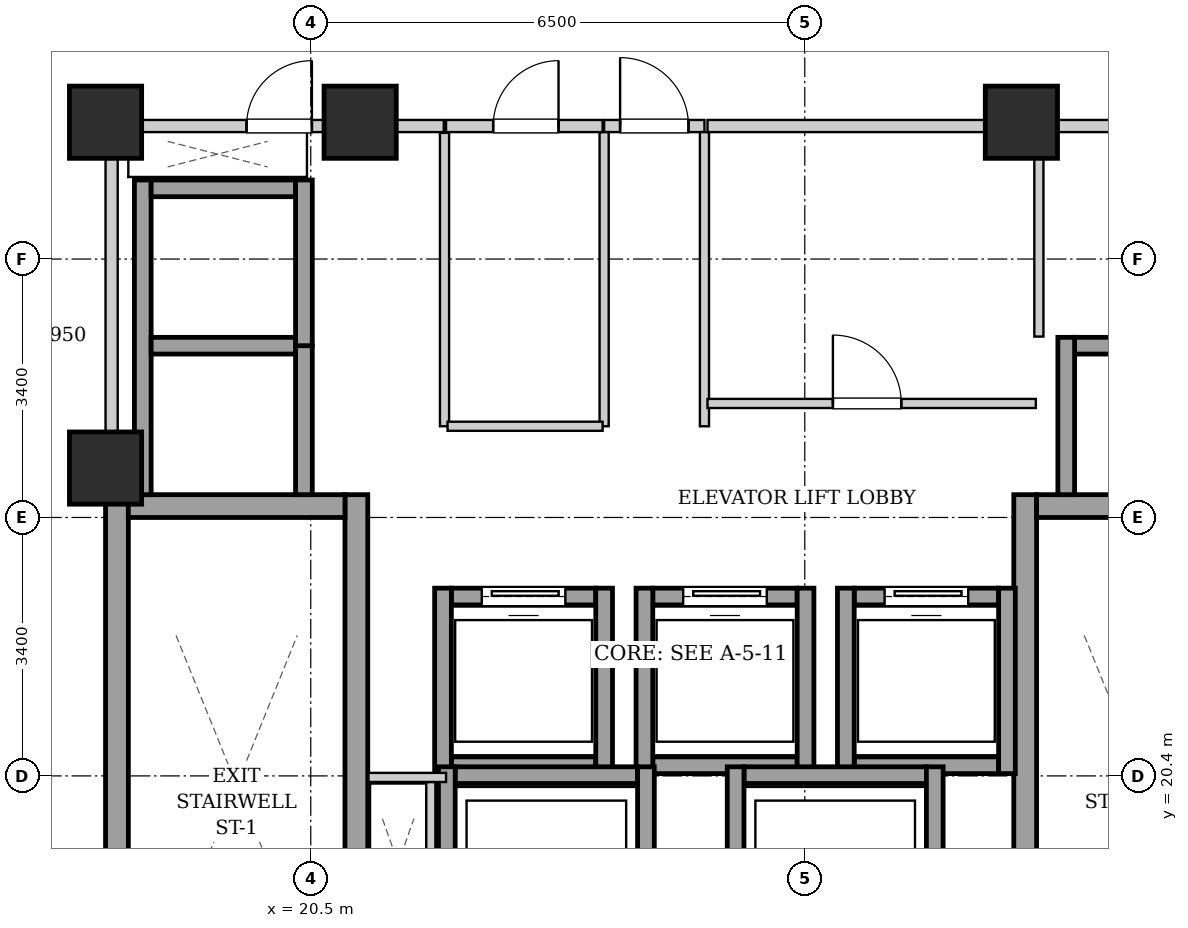
"""IFC4 building model, lengths in metres.
Left out: names, types, materials, properties, quantities, classifications, styles, units other than length and angle.
Written with IfcOpenShell. Run it as: python <this file> out.ifc"""

import sys

from ifc_helpers import new_model, si_unit, direction, frame, frame_2d, origin, origin_2d, place, context, subcontext, project, spatial, rectangle, extrude, element, fill, save


model = new_model("IFC4")
c1 = context("Model", 3, precision=1e-05, world=origin(), true_north=direction((0.0, 1.0)))
c2 = subcontext(c1, "Body", "Model", "MODEL_VIEW")
j1 = project(units=[si_unit("LENGTHUNIT", "METRE"), si_unit("PLANEANGLEUNIT", "RADIAN")], contexts=[c1])
p1 = place(None, origin())
s1 = spatial("IfcSite", under=j1, at=p1, CompositionType="ELEMENT")
p2 = place(p1, origin())
s2 = spatial("IfcBuilding", under=s1, at=p2, CompositionType="ELEMENT")
p3 = place(p2, frame((0.0, 0.0, 143.9)))
s3 = spatial("IfcBuildingStorey", under=s2, at=p3, CompositionType="ELEMENT", Elevation=143.9)
for number, where, z_axis, x_axis in (
    (1, (17.8, 29.0, 0.0), (0.0, 0.0, 1.0), (1.0, 0.0, 0.0)),
    (2, (21.15, 29.0, 0.0), (0.0, 0.0, 1.0), (1.0, 0.0, 0.0)),
    (3, (29.85, 29.0, 0.0), (0.0, 0.0, 1.0), (1.0, 0.0, 0.0)),
    (4, (17.8, 24.45, 0.0), (0.0, 0.0, 1.0), (1.0, 0.0, 0.0)),
):
    element("IfcColumn", number, at=place(p3, frame(where, z_axis=z_axis, x_axis=x_axis)), inside=s3, PredefinedType="COLUMN", context=c2, shape_type="SweptSolid", body=[
        extrude(rectangle(XDim=0.95, YDim=0.95, at=origin_2d()), origin(), (0.0, 0.0, 1.0), 3.25),
    ])
for number, where, z_axis, x_axis in (
    (5, (17.95, 15.1, 0.0), (0.0, 0.0, 1.0), (0.0, 1.0, 0.0)),
    (6, (21.1, 15.1, 0.0), (0.0, 0.0, 1.0), (0.0, 1.0, 0.0)),
):
    element("IfcWall", number, at=place(p3, frame(where, z_axis=z_axis, x_axis=x_axis)), inside=s3, PredefinedType="SHEAR", context=c2, shape_type="SweptSolid", body=[
        extrude(rectangle(XDim=9.0, YDim=0.3, at=frame_2d((4.5, 0.0))), origin(), (0.0, 0.0, 1.0), 2.99),
    ])
p4 = place(p3, frame((18.1, 23.95, 0.0), z_axis=(0.0, 0.0, 1.0), x_axis=(1.0, 0.0, 0.0)))
e7 = element("IfcWall", 7, at=p4, inside=s3, PredefinedType="SHEAR", context=c2, shape_type="SweptSolid", body=[
    extrude(rectangle(XDim=2.85, YDim=0.3, at=frame_2d((1.425, 0.0))), origin(), (0.0, 0.0, 1.0), 2.99),
])
p5 = place(p3, frame((29.9, 15.1, 0.0), z_axis=(0.0, 0.0, 1.0), x_axis=(0.0, 1.0, 0.0)))
e8 = element("IfcWall", 8, at=p5, inside=s3, PredefinedType="SHEAR", context=c2, shape_type="SweptSolid", body=[
    extrude(rectangle(XDim=9.0, YDim=0.3, at=frame_2d((4.5, 0.0))), origin(), (0.0, 0.0, 1.0), 2.99),
])
p6 = place(p3, frame((30.05, 23.95, 0.0), z_axis=(0.0, 0.0, 1.0), x_axis=(1.0, 0.0, 0.0)))
e9 = element("IfcWall", 9, at=p6, inside=s3, PredefinedType="SHEAR", context=c2, shape_type="SweptSolid", body=[
    extrude(rectangle(XDim=2.85, YDim=0.3, at=frame_2d((1.425, 0.0))), origin(), (0.0, 0.0, 1.0), 2.99),
])
p7 = place(p3, frame((22.35, 20.54, 0.0), z_axis=(0.0, 0.0, 1.0), x_axis=(1.0, 0.0, 0.0)))
e10 = element("IfcWall", 10, at=p7, inside=s3, PredefinedType="SHEAR", context=c2, shape_type="SweptSolid", body=[
    extrude(rectangle(XDim=1.9, YDim=0.22, at=frame_2d((0.95, 0.0))), origin(), (0.0, 0.0, 1.0), 2.99),
])
p8 = place(p3, frame((22.35, 22.76, 0.0), z_axis=(0.0, 0.0, 1.0), x_axis=(1.0, 0.0, 0.0)))
e11 = element("IfcWall", 11, at=p8, inside=s3, PredefinedType="SHEAR", context=c2, shape_type="SweptSolid", body=[
    extrude(rectangle(XDim=1.9, YDim=0.22, at=frame_2d((0.95, 0.0))), origin(), (0.0, 0.0, 1.0), 2.99),
])
p9 = place(p8, frame((0.4, 0.0, 0.0)))
e12 = element("IfcOpeningElement", 12, at=p9, cuts=e11, PredefinedType="OPENING", context=c2, shape_type="SweptSolid", body=[
    extrude(rectangle(XDim=1.1, YDim=2.15, at=frame_2d((0.55, 1.075))), frame((0.0, 0.12, 0.0), z_axis=(0.0, -1.0, 0.0), x_axis=(1.0, 0.0, 0.0)), (0.0, 0.0, 1.0), 0.24),
])
for number, where, z_axis, x_axis in (
    (13, (22.24, 20.43, 0.0), (0.0, 0.0, 1.0), (0.0, 1.0, 0.0)),
    (14, (24.36, 20.43, 0.0), (0.0, 0.0, 1.0), (0.0, 1.0, 0.0)),
):
    element("IfcWall", number, at=place(p3, frame(where, z_axis=z_axis, x_axis=x_axis)), inside=s3, PredefinedType="SHEAR", context=c2, shape_type="SweptSolid", body=[
        extrude(rectangle(XDim=2.44, YDim=0.22, at=frame_2d((1.22, 0.0))), origin(), (0.0, 0.0, 1.0), 2.99),
    ])
p10 = place(p3, frame((25.0, 20.54, 0.0), z_axis=(0.0, 0.0, 1.0), x_axis=(1.0, 0.0, 0.0)))
e15 = element("IfcWall", 15, at=p10, inside=s3, PredefinedType="SHEAR", context=c2, shape_type="SweptSolid", body=[
    extrude(rectangle(XDim=1.9, YDim=0.22, at=frame_2d((0.95, 0.0))), origin(), (0.0, 0.0, 1.0), 2.99),
])
p11 = place(p3, frame((25.0, 22.76, 0.0), z_axis=(0.0, 0.0, 1.0), x_axis=(1.0, 0.0, 0.0)))
e16 = element("IfcWall", 16, at=p11, inside=s3, PredefinedType="SHEAR", context=c2, shape_type="SweptSolid", body=[
    extrude(rectangle(XDim=1.9, YDim=0.22, at=frame_2d((0.95, 0.0))), origin(), (0.0, 0.0, 1.0), 2.99),
])
p12 = place(p11, frame((0.4, 0.0, 0.0)))
e17 = element("IfcOpeningElement", 17, at=p12, cuts=e16, PredefinedType="OPENING", context=c2, shape_type="SweptSolid", body=[
    extrude(rectangle(XDim=1.1, YDim=2.15, at=frame_2d((0.55, 1.075))), frame((0.0, 0.12, 0.0), z_axis=(0.0, -1.0, 0.0), x_axis=(1.0, 0.0, 0.0)), (0.0, 0.0, 1.0), 0.24),
])
for number, where, z_axis, x_axis in (
    (18, (24.89, 20.43, 0.0), (0.0, 0.0, 1.0), (0.0, 1.0, 0.0)),
    (19, (27.01, 20.43, 0.0), (0.0, 0.0, 1.0), (0.0, 1.0, 0.0)),
):
    element("IfcWall", number, at=place(p3, frame(where, z_axis=z_axis, x_axis=x_axis)), inside=s3, PredefinedType="SHEAR", context=c2, shape_type="SweptSolid", body=[
        extrude(rectangle(XDim=2.44, YDim=0.22, at=frame_2d((1.22, 0.0))), origin(), (0.0, 0.0, 1.0), 2.99),
    ])
p13 = place(p3, frame((27.65, 20.54, 0.0), z_axis=(0.0, 0.0, 1.0), x_axis=(1.0, 0.0, 0.0)))
e20 = element("IfcWall", 20, at=p13, inside=s3, PredefinedType="SHEAR", context=c2, shape_type="SweptSolid", body=[
    extrude(rectangle(XDim=1.9, YDim=0.22, at=frame_2d((0.95, 0.0))), origin(), (0.0, 0.0, 1.0), 2.99),
])
p14 = place(p3, frame((27.65, 22.76, 0.0), z_axis=(0.0, 0.0, 1.0), x_axis=(1.0, 0.0, 0.0)))
e21 = element("IfcWall", 21, at=p14, inside=s3, PredefinedType="SHEAR", context=c2, shape_type="SweptSolid", body=[
    extrude(rectangle(XDim=1.9, YDim=0.22, at=frame_2d((0.95, 0.0))), origin(), (0.0, 0.0, 1.0), 2.99),
])
p15 = place(p14, frame((0.4, 0.0, 0.0)))
e22 = element("IfcOpeningElement", 22, at=p15, cuts=e21, PredefinedType="OPENING", context=c2, shape_type="SweptSolid", body=[
    extrude(rectangle(XDim=1.1, YDim=2.15, at=frame_2d((0.55, 1.075))), frame((0.0, 0.12, 0.0), z_axis=(0.0, -1.0, 0.0), x_axis=(1.0, 0.0, 0.0)), (0.0, 0.0, 1.0), 0.24),
])
for number, where, z_axis, x_axis in (
    (23, (27.54, 20.43, 0.0), (0.0, 0.0, 1.0), (0.0, 1.0, 0.0)),
    (24, (29.66, 20.43, 0.0), (0.0, 0.0, 1.0), (0.0, 1.0, 0.0)),
):
    element("IfcWall", number, at=place(p3, frame(where, z_axis=z_axis, x_axis=x_axis)), inside=s3, PredefinedType="SHEAR", context=c2, shape_type="SweptSolid", body=[
        extrude(rectangle(XDim=2.44, YDim=0.22, at=frame_2d((1.22, 0.0))), origin(), (0.0, 0.0, 1.0), 2.99),
    ])
p16 = place(p3, frame((18.29, 24.1, 0.0), z_axis=(0.0, 0.0, 1.0), x_axis=(0.0, 1.0, 0.0)))
e25 = element("IfcWall", 25, at=p16, inside=s3, PredefinedType="SHEAR", context=c2, shape_type="SweptSolid", body=[
    extrude(rectangle(XDim=4.14, YDim=0.22, at=frame_2d((2.07, 0.0))), origin(), (0.0, 0.0, 1.0), 2.99),
])
p17 = place(p3, frame((20.41, 24.1, 0.0), z_axis=(0.0, 0.0, 1.0), x_axis=(0.0, 1.0, 0.0)))
e26 = element("IfcWall", 26, at=p17, inside=s3, PredefinedType="SHEAR", context=c2, shape_type="SweptSolid", body=[
    extrude(rectangle(XDim=1.96, YDim=0.22, at=frame_2d((0.98, 0.0))), origin(), (0.0, 0.0, 1.0), 2.99),
])
for number, where, z_axis, x_axis in (
    (27, (18.4, 26.06, 0.0), (0.0, 0.0, 1.0), (1.0, 0.0, 0.0)),
    (28, (18.4, 28.13, 0.0), (0.0, 0.0, 1.0), (1.0, 0.0, 0.0)),
):
    element("IfcWall", number, at=place(p3, frame(where, z_axis=z_axis, x_axis=x_axis)), inside=s3, PredefinedType="SHEAR", context=c2, shape_type="SweptSolid", body=[
        extrude(rectangle(XDim=1.9, YDim=0.22, at=frame_2d((0.95, 0.0))), origin(), (0.0, 0.0, 1.0), 2.99),
    ])
p18 = place(p3, frame((20.41, 26.06, 0.0), z_axis=(0.0, 0.0, 1.0), x_axis=(0.0, 1.0, 0.0)))
e29 = element("IfcWall", 29, at=p18, inside=s3, PredefinedType="SHEAR", context=c2, shape_type="SweptSolid", body=[
    extrude(rectangle(XDim=2.18, YDim=0.22, at=frame_2d((1.09, 0.0))), origin(), (0.0, 0.0, 1.0), 2.99),
])
p19 = place(p3, frame((30.55, 26.06, 0.0), z_axis=(0.0, 0.0, 1.0), x_axis=(1.0, 0.0, 0.0)))
e30 = element("IfcWall", 30, at=p19, inside=s3, PredefinedType="SHEAR", context=c2, shape_type="SweptSolid", body=[
    extrude(rectangle(XDim=1.9, YDim=0.22, at=frame_2d((0.95, 0.0))), origin(), (0.0, 0.0, 1.0), 2.99),
])
p20 = place(p3, frame((30.44, 24.1, 0.0), z_axis=(0.0, 0.0, 1.0), x_axis=(0.0, 1.0, 0.0)))
e31 = element("IfcWall", 31, at=p20, inside=s3, PredefinedType="SHEAR", context=c2, shape_type="SweptSolid", body=[
    extrude(rectangle(XDim=2.07, YDim=0.22, at=frame_2d((1.035, 0.0))), origin(), (0.0, 0.0, 1.0), 2.99),
])
p21 = place(p3, frame((22.4, 20.41, 0.0), z_axis=(0.0, 0.0, 1.0), x_axis=(1.0, 0.0, 0.0)))
e32 = element("IfcWall", 32, at=p21, inside=s3, PredefinedType="SHEAR", context=c2, shape_type="SweptSolid", body=[
    extrude(rectangle(XDim=2.4, YDim=0.22, at=frame_2d((1.2, 0.0))), origin(), (0.0, 0.0, 1.0), 2.99),
])
for number, where, z_axis, x_axis in (
    (33, (22.29, 17.98, 0.0), (0.0, 0.0, 1.0), (0.0, 1.0, 0.0)),
    (34, (24.91, 17.98, 0.0), (0.0, 0.0, 1.0), (0.0, 1.0, 0.0)),
):
    element("IfcWall", number, at=place(p3, frame(where, z_axis=z_axis, x_axis=x_axis)), inside=s3, PredefinedType="SHEAR", context=c2, shape_type="SweptSolid", body=[
        extrude(rectangle(XDim=2.54, YDim=0.22, at=frame_2d((1.27, 0.0))), origin(), (0.0, 0.0, 1.0), 2.99),
    ])
p22 = place(p3, frame((26.2, 20.41, 0.0), z_axis=(0.0, 0.0, 1.0), x_axis=(1.0, 0.0, 0.0)))
e35 = element("IfcWall", 35, at=p22, inside=s3, PredefinedType="SHEAR", context=c2, shape_type="SweptSolid", body=[
    extrude(rectangle(XDim=2.4, YDim=0.22, at=frame_2d((1.2, 0.0))), origin(), (0.0, 0.0, 1.0), 2.99),
])
for number, where, z_axis, x_axis in (
    (36, (26.09, 17.98, 0.0), (0.0, 0.0, 1.0), (0.0, 1.0, 0.0)),
    (37, (28.71, 17.98, 0.0), (0.0, 0.0, 1.0), (0.0, 1.0, 0.0)),
):
    element("IfcWall", number, at=place(p3, frame(where, z_axis=z_axis, x_axis=x_axis)), inside=s3, PredefinedType="SHEAR", context=c2, shape_type="SweptSolid", body=[
        extrude(rectangle(XDim=2.54, YDim=0.22, at=frame_2d((1.27, 0.0))), origin(), (0.0, 0.0, 1.0), 2.99),
    ])
p23 = place(p3, frame((17.88, 24.12, 0.0), z_axis=(0.0, 0.0, 1.0), x_axis=(0.0, 1.0, 0.0)))
e38 = element("IfcWall", 38, at=p23, inside=s3, PredefinedType="PARTITIONING", context=c2, shape_type="SweptSolid", body=[
    extrude(rectangle(XDim=4.76, YDim=0.16, at=frame_2d((2.38, 0.0))), origin(), (0.0, 0.0, 1.0), 2.99),
])
p24 = place(p3, frame((24.36, 28.95, 0.0), z_axis=(0.0, 0.0, 1.0), x_axis=(1.0, 0.0, 0.0)))
e39 = element("IfcWall", 39, at=p24, inside=s3, PredefinedType="PARTITIONING", context=c2, shape_type="SweptSolid", body=[
    extrude(rectangle(XDim=1.32, YDim=0.16, at=frame_2d((0.66, 0.0))), origin(), (0.0, 0.0, 1.0), 2.426),
])
p25 = place(p24, frame((0.21, 0.0, 0.0)))
e40 = element("IfcOpeningElement", 40, at=p25, cuts=e39, PredefinedType="OPENING", context=c2, shape_type="SweptSolid", body=[
    extrude(rectangle(XDim=0.9, YDim=2.05, at=frame_2d((0.45, 1.025))), frame((0.0, 0.09, 0.0), z_axis=(0.0, -1.0, 0.0), x_axis=(1.0, 0.0, 0.0)), (0.0, 0.0, 1.0), 0.18),
])
p26 = place(p3, frame((17.96, 28.95, 0.0), z_axis=(0.0, 0.0, 1.0), x_axis=(1.0, 0.0, 0.0)))
e41 = element("IfcWall", 41, at=p26, inside=s3, PredefinedType="PARTITIONING", context=c2, shape_type="SweptSolid", body=[
    extrude(rectangle(XDim=4.29, YDim=0.16, at=frame_2d((2.145, 0.0))), origin(), (0.0, 0.0, 1.0), 2.426),
])
p27 = place(p26, frame((1.695, 0.0, 0.0)))
e42 = element("IfcOpeningElement", 42, at=p27, cuts=e41, PredefinedType="OPENING", context=c2, shape_type="SweptSolid", body=[
    extrude(rectangle(XDim=0.86, YDim=2.05, at=frame_2d((0.43, 1.025))), frame((0.0, 0.09, 0.0), z_axis=(0.0, -1.0, 0.0), x_axis=(1.0, 0.0, 0.0)), (0.0, 0.0, 1.0), 0.18),
])
p28 = place(p3, frame((22.08, 18.2, 0.0), z_axis=(0.0, 0.0, 1.0), x_axis=(0.0, 1.0, 0.0)))
e43 = element("IfcWall", 43, at=p28, inside=s3, PredefinedType="PARTITIONING", context=c2, shape_type="SweptSolid", body=[
    extrude(rectangle(XDim=2.12, YDim=0.12, at=frame_2d((1.06, 0.0))), origin(), (0.0, 0.0, 1.0), 2.99),
])
p29 = place(p3, frame((22.28, 20.38, 0.0), z_axis=(0.0, 0.0, 1.0), x_axis=(-1.0, 0.0, 0.0)))
e44 = element("IfcWall", 44, at=p29, inside=s3, PredefinedType="PARTITIONING", context=c2, shape_type="SweptSolid", body=[
    extrude(rectangle(XDim=1.02, YDim=0.12, at=frame_2d((0.51, 0.0))), origin(), (0.0, 0.0, 1.0), 2.99),
])
for number, where, z_axis, x_axis in (
    (45, (24.36, 25.0, 0.0), (0.0, 0.0, 1.0), (0.0, 1.0, 0.0)),
    (46, (25.68, 25.0, 0.0), (0.0, 0.0, 1.0), (0.0, 1.0, 0.0)),
):
    element("IfcWall", number, at=place(p3, frame(where, z_axis=z_axis, x_axis=x_axis)), inside=s3, PredefinedType="PARTITIONING", context=c2, shape_type="SweptSolid", body=[
        extrude(rectangle(XDim=3.87, YDim=0.12, at=frame_2d((1.935, 0.0))), origin(), (0.0, 0.0, 1.0), 2.99),
    ])
p30 = place(p3, frame((30.08, 26.18, 0.0), z_axis=(0.0, 0.0, 1.0), x_axis=(0.0, 1.0, 0.0)))
e47 = element("IfcWall", 47, at=p30, inside=s3, PredefinedType="PARTITIONING", context=c2, shape_type="SweptSolid", body=[
    extrude(rectangle(XDim=2.68, YDim=0.12, at=frame_2d((1.34, 0.0))), origin(), (0.0, 0.0, 1.0), 2.99),
])
p31 = place(p3, frame((30.08, 28.95, 0.0), z_axis=(0.0, 0.0, 1.0), x_axis=(1.0, 0.0, 0.0)))
e48 = element("IfcWall", 48, at=p31, inside=s3, PredefinedType="PARTITIONING", context=c2, shape_type="SweptSolid", body=[
    extrude(rectangle(XDim=2.96, YDim=0.16, at=frame_2d((1.48, 0.0))), origin(), (0.0, 0.0, 1.0), 2.99),
])
p32 = place(p31, frame((1.045, 0.0, 0.0)))
e49 = element("IfcOpeningElement", 49, at=p32, cuts=e48, PredefinedType="OPENING", context=c2, shape_type="SweptSolid", body=[
    extrude(rectangle(XDim=0.86, YDim=2.05, at=frame_2d((0.43, 1.025))), frame((0.0, 0.09, 0.0), z_axis=(0.0, -1.0, 0.0), x_axis=(1.0, 0.0, 0.0)), (0.0, 0.0, 1.0), 0.18),
])
p33 = place(p3, frame((22.26, 25.0, 0.0), z_axis=(0.0, 0.0, 1.0), x_axis=(0.0, 1.0, 0.0)))
e50 = element("IfcWall", 50, at=p33, inside=s3, PredefinedType="PARTITIONING", context=c2, shape_type="SweptSolid", body=[
    extrude(rectangle(XDim=3.86, YDim=0.12, at=frame_2d((1.93, 0.0))), origin(), (0.0, 0.0, 1.0), 2.99),
])
p34 = place(p3, frame((22.3, 25.0, 0.0), z_axis=(0.0, 0.0, 1.0), x_axis=(1.0, 0.0, 0.0)))
e51 = element("IfcWall", 51, at=p34, inside=s3, PredefinedType="PARTITIONING", context=c2, shape_type="SweptSolid", body=[
    extrude(rectangle(XDim=2.04, YDim=0.12, at=frame_2d((1.02, 0.0))), origin(), (0.0, 0.0, 1.0), 2.99),
])
p35 = place(p3, frame((22.28, 28.95, 0.0), z_axis=(0.0, 0.0, 1.0), x_axis=(1.0, 0.0, 0.0)))
e52 = element("IfcWall", 52, at=p35, inside=s3, PredefinedType="PARTITIONING", context=c2, shape_type="SweptSolid", body=[
    extrude(rectangle(XDim=2.06, YDim=0.16, at=frame_2d((1.03, 0.0))), origin(), (0.0, 0.0, 1.0), 2.426),
])
p36 = place(p35, frame((0.62, 0.0, 0.0)))
e53 = element("IfcOpeningElement", 53, at=p36, cuts=e52, PredefinedType="OPENING", context=c2, shape_type="SweptSolid", body=[
    extrude(rectangle(XDim=0.86, YDim=2.05, at=frame_2d((0.43, 1.025))), frame((0.0, 0.09, 0.0), z_axis=(0.0, -1.0, 0.0), x_axis=(1.0, 0.0, 0.0)), (0.0, 0.0, 1.0), 0.18),
])
p37 = place(p3, frame((25.72, 28.95, 0.0), z_axis=(0.0, 0.0, 1.0), x_axis=(1.0, 0.0, 0.0)))
e54 = element("IfcWall", 54, at=p37, inside=s3, PredefinedType="PARTITIONING", context=c2, shape_type="SweptSolid", body=[
    extrude(rectangle(XDim=4.32, YDim=0.16, at=frame_2d((2.16, 0.0))), origin(), (0.0, 0.0, 1.0), 2.426),
])
p38 = place(p3, frame((25.72, 25.3, 0.0), z_axis=(0.0, 0.0, 1.0), x_axis=(1.0, 0.0, 0.0)))
e55 = element("IfcWall", 55, at=p38, inside=s3, PredefinedType="PARTITIONING", context=c2, shape_type="SweptSolid", body=[
    extrude(rectangle(XDim=4.32, YDim=0.12, at=frame_2d((2.16, 0.0))), origin(), (0.0, 0.0, 1.0), 2.99),
])
p39 = place(p38, frame((1.65, 0.0, 0.0)))
e56 = element("IfcOpeningElement", 56, at=p39, cuts=e55, PredefinedType="OPENING", context=c2, shape_type="SweptSolid", body=[
    extrude(rectangle(XDim=0.9, YDim=2.05, at=frame_2d((0.45, 1.025))), frame((0.0, 0.07, 0.0), z_axis=(0.0, -1.0, 0.0), x_axis=(1.0, 0.0, 0.0)), (0.0, 0.0, 1.0), 0.14),
])
p40 = place(p9, origin())
e57 = element("IfcDoor", 57, at=p40, inside=s3, OperationType="SLIDING_TO_LEFT", PredefinedType="DOOR", context=c2, shape_type="SweptSolid", body=[
    extrude(rectangle(XDim=1.1, YDim=2.15, at=frame_2d((0.55, 1.075))), frame((0.0, 0.025, 0.0), z_axis=(0.0, -1.0, 0.0), x_axis=(1.0, 0.0, 0.0)), (0.0, 0.0, 1.0), 0.05),
])
fill(e12, e57)
p41 = place(p12, origin())
e58 = element("IfcDoor", 58, at=p41, inside=s3, OperationType="SLIDING_TO_LEFT", PredefinedType="DOOR", context=c2, shape_type="SweptSolid", body=[
    extrude(rectangle(XDim=1.1, YDim=2.15, at=frame_2d((0.55, 1.075))), frame((0.0, 0.025, 0.0), z_axis=(0.0, -1.0, 0.0), x_axis=(1.0, 0.0, 0.0)), (0.0, 0.0, 1.0), 0.05),
])
fill(e17, e58)
p42 = place(p15, origin())
e59 = element("IfcDoor", 59, at=p42, inside=s3, OperationType="SLIDING_TO_LEFT", PredefinedType="DOOR", context=c2, shape_type="SweptSolid", body=[
    extrude(rectangle(XDim=1.1, YDim=2.15, at=frame_2d((0.55, 1.075))), frame((0.0, 0.025, 0.0), z_axis=(0.0, -1.0, 0.0), x_axis=(1.0, 0.0, 0.0)), (0.0, 0.0, 1.0), 0.05),
])
fill(e22, e59)
p43 = place(p25, origin())
e60 = element("IfcDoor", 60, at=p43, inside=s3, OperationType="SINGLE_SWING_LEFT", PredefinedType="DOOR", context=c2, shape_type="SweptSolid", body=[
    extrude(rectangle(XDim=0.9, YDim=2.05, at=frame_2d((0.45, 1.025))), frame((0.0, 0.025, 0.0), z_axis=(0.0, -1.0, 0.0), x_axis=(1.0, 0.0, 0.0)), (0.0, 0.0, 1.0), 0.05),
])
fill(e40, e60)
p44 = place(p27, origin())
e61 = element("IfcDoor", 61, at=p44, inside=s3, OperationType="SINGLE_SWING_RIGHT", PredefinedType="DOOR", context=c2, shape_type="SweptSolid", body=[
    extrude(rectangle(XDim=0.86, YDim=2.05, at=frame_2d((0.43, 1.025))), frame((0.0, 0.025, 0.0), z_axis=(0.0, -1.0, 0.0), x_axis=(1.0, 0.0, 0.0)), (0.0, 0.0, 1.0), 0.05),
])
fill(e42, e61)
p45 = place(p36, origin())
e62 = element("IfcDoor", 62, at=p45, inside=s3, OperationType="SINGLE_SWING_RIGHT", PredefinedType="DOOR", context=c2, shape_type="SweptSolid", body=[
    extrude(rectangle(XDim=0.86, YDim=2.05, at=frame_2d((0.43, 1.025))), frame((0.0, 0.025, 0.0), z_axis=(0.0, -1.0, 0.0), x_axis=(1.0, 0.0, 0.0)), (0.0, 0.0, 1.0), 0.05),
])
fill(e53, e62)
p46 = place(p39, origin())
e63 = element("IfcDoor", 63, at=p46, inside=s3, OperationType="SINGLE_SWING_LEFT", PredefinedType="DOOR", context=c2, shape_type="SweptSolid", body=[
    extrude(rectangle(XDim=0.9, YDim=2.05, at=frame_2d((0.45, 1.025))), frame((0.0, 0.025, 0.0), z_axis=(0.0, -1.0, 0.0), x_axis=(1.0, 0.0, 0.0)), (0.0, 0.0, 1.0), 0.05),
])
fill(e56, e63)
save(model, sys.argv[1])
